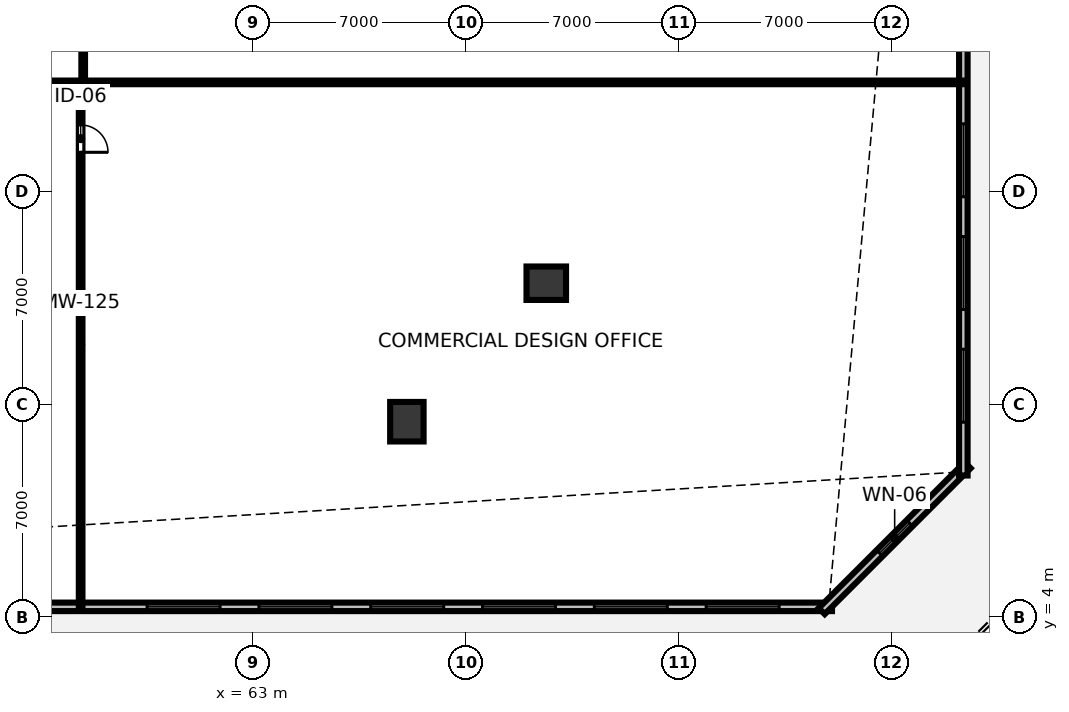
"""IFC4 building model, lengths in metres.
Left out: names, types, materials, properties, quantities, classifications, styles, units other than length and angle.
Written with IfcOpenShell. Run it as: python <this file> out.ifc"""

import sys

from ifc_helpers import new_model, si_unit, direction, frame, frame_2d, origin, origin_2d, place, context, subcontext, project, spatial, rectangle, hollow_rectangle, extrude, element, fill, save


model = new_model("IFC4")
c1 = context("Model", 3, precision=1e-05, world=origin(), true_north=direction((0.0, 1.0)))
c2 = subcontext(c1, "Body", "Model", "MODEL_VIEW")
j1 = project(units=[si_unit("LENGTHUNIT", "METRE"), si_unit("PLANEANGLEUNIT", "RADIAN")], contexts=[c1])
p1 = place(None, origin())
s1 = spatial("IfcSite", under=j1, at=p1, CompositionType="ELEMENT")
p2 = place(p1, origin())
s2 = spatial("IfcBuilding", under=s1, at=p2, CompositionType="ELEMENT")
p3 = place(p2, frame((0.0, 0.0, 5.0)))
s3 = spatial("IfcBuildingStorey", under=s2, at=p3, CompositionType="ELEMENT", Elevation=5.0)
for number, where, z_axis, x_axis in (
    (1, (68.057, 10.429, 0.0), (0.0, 0.0, 1.0), (1.0, 0.0, 0.0)),
    (2, (72.642, 14.984, 0.0), (0.0, 0.0, 1.0), (0.0, 1.0, 0.0)),
):
    element("IfcColumn", number, at=place(p3, frame(where, z_axis=z_axis, x_axis=x_axis)), inside=s3, PredefinedType="COLUMN", context=c2, shape_type="SweptSolid", body=[
        extrude(hollow_rectangle(XDim=1.1, YDim=1.3, WallThickness=0.07, at=origin_2d()), origin(), (0.0, 0.0, 1.0), 4.218),
    ])
p4 = place(p3, frame((9.96, 4.34, 0.0), z_axis=(0.0, 0.0, 1.0), x_axis=(1.0, 0.0, 0.0)))
e3 = element("IfcWall", 3, at=p4, inside=s3, PredefinedType="STANDARD", context=c2, shape_type="SweptSolid", body=[
    extrude(rectangle(XDim=72.08, YDim=0.28, at=frame_2d((36.04, 0.0))), origin(), (0.0, 0.0, 1.0), 4.22),
])
p5 = place(p4, frame((1.739, 0.0, 0.85)))
e4 = element("IfcOpeningElement", 4, at=p5, cuts=e3, PredefinedType="OPENING", context=c2, shape_type="SweptSolid", body=[
    extrude(rectangle(XDim=2.4, YDim=2.4, at=frame_2d((1.2, 1.2))), frame((0.0, 0.15, 0.0), z_axis=(0.0, -1.0, 0.0), x_axis=(1.0, 0.0, 0.0)), (0.0, 0.0, 1.0), 0.3),
])
p6 = place(p4, frame((5.417, 0.0, 0.85)))
e5 = element("IfcOpeningElement", 5, at=p6, cuts=e3, PredefinedType="OPENING", context=c2, shape_type="SweptSolid", body=[
    extrude(rectangle(XDim=2.4, YDim=2.4, at=frame_2d((1.2, 1.2))), frame((0.0, 0.15, 0.0), z_axis=(0.0, -1.0, 0.0), x_axis=(1.0, 0.0, 0.0)), (0.0, 0.0, 1.0), 0.3),
])
p7 = place(p4, frame((9.095, 0.0, 0.85)))
e6 = element("IfcOpeningElement", 6, at=p7, cuts=e3, PredefinedType="OPENING", context=c2, shape_type="SweptSolid", body=[
    extrude(rectangle(XDim=2.4, YDim=2.4, at=frame_2d((1.2, 1.2))), frame((0.0, 0.15, 0.0), z_axis=(0.0, -1.0, 0.0), x_axis=(1.0, 0.0, 0.0)), (0.0, 0.0, 1.0), 0.3),
])
p8 = place(p4, frame((12.773, 0.0, 0.85)))
e7 = element("IfcOpeningElement", 7, at=p8, cuts=e3, PredefinedType="OPENING", context=c2, shape_type="SweptSolid", body=[
    extrude(rectangle(XDim=2.4, YDim=2.4, at=frame_2d((1.2, 1.2))), frame((0.0, 0.15, 0.0), z_axis=(0.0, -1.0, 0.0), x_axis=(1.0, 0.0, 0.0)), (0.0, 0.0, 1.0), 0.3),
])
p9 = place(p4, frame((16.45, 0.0, 0.85)))
e8 = element("IfcOpeningElement", 8, at=p9, cuts=e3, PredefinedType="OPENING", context=c2, shape_type="SweptSolid", body=[
    extrude(rectangle(XDim=2.4, YDim=2.4, at=frame_2d((1.2, 1.2))), frame((0.0, 0.15, 0.0), z_axis=(0.0, -1.0, 0.0), x_axis=(1.0, 0.0, 0.0)), (0.0, 0.0, 1.0), 0.3),
])
p10 = place(p4, frame((20.128, 0.0, 0.85)))
e9 = element("IfcOpeningElement", 9, at=p10, cuts=e3, PredefinedType="OPENING", context=c2, shape_type="SweptSolid", body=[
    extrude(rectangle(XDim=2.4, YDim=2.4, at=frame_2d((1.2, 1.2))), frame((0.0, 0.15, 0.0), z_axis=(0.0, -1.0, 0.0), x_axis=(1.0, 0.0, 0.0)), (0.0, 0.0, 1.0), 0.3),
])
p11 = place(p4, frame((23.806, 0.0, 0.85)))
e10 = element("IfcOpeningElement", 10, at=p11, cuts=e3, PredefinedType="OPENING", context=c2, shape_type="SweptSolid", body=[
    extrude(rectangle(XDim=2.4, YDim=2.4, at=frame_2d((1.2, 1.2))), frame((0.0, 0.15, 0.0), z_axis=(0.0, -1.0, 0.0), x_axis=(1.0, 0.0, 0.0)), (0.0, 0.0, 1.0), 0.3),
])
p12 = place(p4, frame((27.484, 0.0, 0.85)))
e11 = element("IfcOpeningElement", 11, at=p12, cuts=e3, PredefinedType="OPENING", context=c2, shape_type="SweptSolid", body=[
    extrude(rectangle(XDim=2.4, YDim=2.4, at=frame_2d((1.2, 1.2))), frame((0.0, 0.15, 0.0), z_axis=(0.0, -1.0, 0.0), x_axis=(1.0, 0.0, 0.0)), (0.0, 0.0, 1.0), 0.3),
])
p13 = place(p4, frame((31.162, 0.0, 0.85)))
e12 = element("IfcOpeningElement", 12, at=p13, cuts=e3, PredefinedType="OPENING", context=c2, shape_type="SweptSolid", body=[
    extrude(rectangle(XDim=2.4, YDim=2.4, at=frame_2d((1.2, 1.2))), frame((0.0, 0.15, 0.0), z_axis=(0.0, -1.0, 0.0), x_axis=(1.0, 0.0, 0.0)), (0.0, 0.0, 1.0), 0.3),
])
p14 = place(p4, frame((34.84, 0.0, 0.85)))
e13 = element("IfcOpeningElement", 13, at=p14, cuts=e3, PredefinedType="OPENING", context=c2, shape_type="SweptSolid", body=[
    extrude(rectangle(XDim=2.4, YDim=2.4, at=frame_2d((1.2, 1.2))), frame((0.0, 0.15, 0.0), z_axis=(0.0, -1.0, 0.0), x_axis=(1.0, 0.0, 0.0)), (0.0, 0.0, 1.0), 0.3),
])
p15 = place(p4, frame((38.518, 0.0, 0.85)))
e14 = element("IfcOpeningElement", 14, at=p15, cuts=e3, PredefinedType="OPENING", context=c2, shape_type="SweptSolid", body=[
    extrude(rectangle(XDim=2.4, YDim=2.4, at=frame_2d((1.2, 1.2))), frame((0.0, 0.15, 0.0), z_axis=(0.0, -1.0, 0.0), x_axis=(1.0, 0.0, 0.0)), (0.0, 0.0, 1.0), 0.3),
])
p16 = place(p4, frame((42.196, 0.0, 0.85)))
e15 = element("IfcOpeningElement", 15, at=p16, cuts=e3, PredefinedType="OPENING", context=c2, shape_type="SweptSolid", body=[
    extrude(rectangle(XDim=2.4, YDim=2.4, at=frame_2d((1.2, 1.2))), frame((0.0, 0.15, 0.0), z_axis=(0.0, -1.0, 0.0), x_axis=(1.0, 0.0, 0.0)), (0.0, 0.0, 1.0), 0.3),
])
p17 = place(p4, frame((49.552, 0.0, 0.85)))
e16 = element("IfcOpeningElement", 16, at=p17, cuts=e3, PredefinedType="OPENING", context=c2, shape_type="SweptSolid", body=[
    extrude(rectangle(XDim=2.4, YDim=2.4, at=frame_2d((1.2, 1.2))), frame((0.0, 0.15, 0.0), z_axis=(0.0, -1.0, 0.0), x_axis=(1.0, 0.0, 0.0)), (0.0, 0.0, 1.0), 0.3),
])
p18 = place(p4, frame((53.229, 0.0, 0.85)))
e17 = element("IfcOpeningElement", 17, at=p18, cuts=e3, PredefinedType="OPENING", context=c2, shape_type="SweptSolid", body=[
    extrude(rectangle(XDim=2.4, YDim=2.4, at=frame_2d((1.2, 1.2))), frame((0.0, 0.15, 0.0), z_axis=(0.0, -1.0, 0.0), x_axis=(1.0, 0.0, 0.0)), (0.0, 0.0, 1.0), 0.3),
])
p19 = place(p4, frame((56.907, 0.0, 0.85)))
e18 = element("IfcOpeningElement", 18, at=p19, cuts=e3, PredefinedType="OPENING", context=c2, shape_type="SweptSolid", body=[
    extrude(rectangle(XDim=2.4, YDim=2.4, at=frame_2d((1.2, 1.2))), frame((0.0, 0.15, 0.0), z_axis=(0.0, -1.0, 0.0), x_axis=(1.0, 0.0, 0.0)), (0.0, 0.0, 1.0), 0.3),
])
p20 = place(p4, frame((60.585, 0.0, 0.85)))
e19 = element("IfcOpeningElement", 19, at=p20, cuts=e3, PredefinedType="OPENING", context=c2, shape_type="SweptSolid", body=[
    extrude(rectangle(XDim=2.4, YDim=2.4, at=frame_2d((1.2, 1.2))), frame((0.0, 0.15, 0.0), z_axis=(0.0, -1.0, 0.0), x_axis=(1.0, 0.0, 0.0)), (0.0, 0.0, 1.0), 0.3),
])
p21 = place(p4, frame((64.263, 0.0, 0.85)))
e20 = element("IfcOpeningElement", 20, at=p21, cuts=e3, PredefinedType="OPENING", context=c2, shape_type="SweptSolid", body=[
    extrude(rectangle(XDim=2.4, YDim=2.4, at=frame_2d((1.2, 1.2))), frame((0.0, 0.15, 0.0), z_axis=(0.0, -1.0, 0.0), x_axis=(1.0, 0.0, 0.0)), (0.0, 0.0, 1.0), 0.3),
])
p22 = place(p4, frame((67.941, 0.0, 0.85)))
e21 = element("IfcOpeningElement", 21, at=p22, cuts=e3, PredefinedType="OPENING", context=c2, shape_type="SweptSolid", body=[
    extrude(rectangle(XDim=2.4, YDim=2.4, at=frame_2d((1.2, 1.2))), frame((0.0, 0.15, 0.0), z_axis=(0.0, -1.0, 0.0), x_axis=(1.0, 0.0, 0.0)), (0.0, 0.0, 1.0), 0.3),
])
p23 = place(p3, frame((81.702, 4.2, 0.0), z_axis=(0.0, 0.0, 1.0), x_axis=(0.707106781187, 0.707106781187, 0.0)))
e22 = element("IfcWall", 22, at=p23, inside=s3, PredefinedType="STANDARD", context=c2, shape_type="SweptSolid", body=[
    extrude(rectangle(XDim=6.786, YDim=0.28, at=frame_2d((3.393, 0.0))), origin(), (0.0, 0.0, 1.0), 4.22),
])
p24 = place(p23, frame((2.693, 0.0, 1.5)))
e23 = element("IfcOpeningElement", 23, at=p24, cuts=e22, PredefinedType="OPENING", context=c2, shape_type="SweptSolid", body=[
    extrude(rectangle(XDim=1.4, YDim=1.2, at=frame_2d((0.7, 0.6))), frame((0.0, 0.15, 0.0), z_axis=(0.0, -1.0, 0.0), x_axis=(1.0, 0.0, 0.0)), (0.0, 0.0, 1.0), 0.3),
])
p25 = place(p3, frame((86.36, 8.66, 0.0), z_axis=(0.0, 0.0, 1.0), x_axis=(0.0, 1.0, 0.0)))
e24 = element("IfcWall", 24, at=p25, inside=s3, PredefinedType="STANDARD", context=c2, shape_type="SweptSolid", body=[
    extrude(rectangle(XDim=46.68, YDim=0.28, at=frame_2d((23.34, 0.0))), origin(), (0.0, 0.0, 1.0), 4.22),
])
p26 = place(p25, frame((27.74, 0.0, 0.0)))
e25 = element("IfcOpeningElement", 25, at=p26, cuts=e24, PredefinedType="OPENING", context=c2, shape_type="SweptSolid", body=[
    extrude(rectangle(XDim=1.6, YDim=2.15, at=frame_2d((0.8, 1.075))), frame((0.0, 0.15, 0.0), z_axis=(0.0, -1.0, 0.0), x_axis=(1.0, 0.0, 0.0)), (0.0, 0.0, 1.0), 0.3),
])
p27 = place(p25, frame((1.753, 0.0, 0.85)))
e26 = element("IfcOpeningElement", 26, at=p27, cuts=e24, PredefinedType="OPENING", context=c2, shape_type="SweptSolid", body=[
    extrude(rectangle(XDim=2.4, YDim=2.4, at=frame_2d((1.2, 1.2))), frame((0.0, 0.15, 0.0), z_axis=(0.0, -1.0, 0.0), x_axis=(1.0, 0.0, 0.0)), (0.0, 0.0, 1.0), 0.3),
])
p28 = place(p25, frame((5.46, 0.0, 0.85)))
e27 = element("IfcOpeningElement", 27, at=p28, cuts=e24, PredefinedType="OPENING", context=c2, shape_type="SweptSolid", body=[
    extrude(rectangle(XDim=2.4, YDim=2.4, at=frame_2d((1.2, 1.2))), frame((0.0, 0.15, 0.0), z_axis=(0.0, -1.0, 0.0), x_axis=(1.0, 0.0, 0.0)), (0.0, 0.0, 1.0), 0.3),
])
p29 = place(p25, frame((9.167, 0.0, 0.85)))
e28 = element("IfcOpeningElement", 28, at=p29, cuts=e24, PredefinedType="OPENING", context=c2, shape_type="SweptSolid", body=[
    extrude(rectangle(XDim=2.4, YDim=2.4, at=frame_2d((1.2, 1.2))), frame((0.0, 0.15, 0.0), z_axis=(0.0, -1.0, 0.0), x_axis=(1.0, 0.0, 0.0)), (0.0, 0.0, 1.0), 0.3),
])
p30 = place(p25, frame((16.58, 0.0, 0.85)))
e29 = element("IfcOpeningElement", 29, at=p30, cuts=e24, PredefinedType="OPENING", context=c2, shape_type="SweptSolid", body=[
    extrude(rectangle(XDim=2.4, YDim=2.4, at=frame_2d((1.2, 1.2))), frame((0.0, 0.15, 0.0), z_axis=(0.0, -1.0, 0.0), x_axis=(1.0, 0.0, 0.0)), (0.0, 0.0, 1.0), 0.3),
])
p31 = place(p25, frame((20.287, 0.0, 0.85)))
e30 = element("IfcOpeningElement", 30, at=p31, cuts=e24, PredefinedType="OPENING", context=c2, shape_type="SweptSolid", body=[
    extrude(rectangle(XDim=2.4, YDim=2.4, at=frame_2d((1.2, 1.2))), frame((0.0, 0.15, 0.0), z_axis=(0.0, -1.0, 0.0), x_axis=(1.0, 0.0, 0.0)), (0.0, 0.0, 1.0), 0.3),
])
p32 = place(p25, frame((23.993, 0.0, 0.85)))
e31 = element("IfcOpeningElement", 31, at=p32, cuts=e24, PredefinedType="OPENING", context=c2, shape_type="SweptSolid", body=[
    extrude(rectangle(XDim=2.4, YDim=2.4, at=frame_2d((1.2, 1.2))), frame((0.0, 0.15, 0.0), z_axis=(0.0, -1.0, 0.0), x_axis=(1.0, 0.0, 0.0)), (0.0, 0.0, 1.0), 0.3),
])
p33 = place(p25, frame((35.113, 0.0, 0.85)))
e32 = element("IfcOpeningElement", 32, at=p33, cuts=e24, PredefinedType="OPENING", context=c2, shape_type="SweptSolid", body=[
    extrude(rectangle(XDim=2.4, YDim=2.4, at=frame_2d((1.2, 1.2))), frame((0.0, 0.15, 0.0), z_axis=(0.0, -1.0, 0.0), x_axis=(1.0, 0.0, 0.0)), (0.0, 0.0, 1.0), 0.3),
])
p34 = place(p25, frame((38.82, 0.0, 0.85)))
e33 = element("IfcOpeningElement", 33, at=p34, cuts=e24, PredefinedType="OPENING", context=c2, shape_type="SweptSolid", body=[
    extrude(rectangle(XDim=2.4, YDim=2.4, at=frame_2d((1.2, 1.2))), frame((0.0, 0.15, 0.0), z_axis=(0.0, -1.0, 0.0), x_axis=(1.0, 0.0, 0.0)), (0.0, 0.0, 1.0), 0.3),
])
p35 = place(p25, frame((42.527, 0.0, 0.85)))
e34 = element("IfcOpeningElement", 34, at=p35, cuts=e24, PredefinedType="OPENING", context=c2, shape_type="SweptSolid", body=[
    extrude(rectangle(XDim=2.4, YDim=2.4, at=frame_2d((1.2, 1.2))), frame((0.0, 0.15, 0.0), z_axis=(0.0, -1.0, 0.0), x_axis=(1.0, 0.0, 0.0)), (0.0, 0.0, 1.0), 0.3),
])
p36 = place(p3, frame((57.326, 21.59, 0.0), z_axis=(0.0, 0.0, 1.0), x_axis=(0.0, -1.0, 0.0)))
e35 = element("IfcWall", 35, at=p36, inside=s3, PredefinedType="MOVABLE", context=c2, shape_type="SweptSolid", body=[
    extrude(rectangle(XDim=17.25, YDim=0.12, at=frame_2d((8.625, 0.0))), origin(), (0.0, 0.0, 1.0), 3.32),
])
p37 = place(p36, frame((1.4, 0.0, 0.0)))
e36 = element("IfcOpeningElement", 36, at=p37, cuts=e35, PredefinedType="OPENING", context=c2, shape_type="SweptSolid", body=[
    extrude(rectangle(XDim=0.9, YDim=2.15, at=frame_2d((0.45, 1.075))), frame((0.0, 0.07, 0.0), z_axis=(0.0, -1.0, 0.0), x_axis=(1.0, 0.0, 0.0)), (0.0, 0.0, 1.0), 0.14),
])
p38 = place(p3, frame((34.65, 21.59, 0.0), z_axis=(0.0, 0.0, 1.0), x_axis=(1.0, 0.0, 0.0)))
e37 = element("IfcWall", 37, at=p38, inside=s3, PredefinedType="PARTITIONING", context=c2, shape_type="SweptSolid", body=[
    extrude(rectangle(XDim=22.7, YDim=0.12, at=frame_2d((11.35, 0.0))), origin(), (0.0, 0.0, 1.0), 3.32),
])
p39 = place(p38, frame((10.875, 0.0, 0.0)))
e38 = element("IfcOpeningElement", 38, at=p39, cuts=e37, PredefinedType="OPENING", context=c2, shape_type="SweptSolid", body=[
    extrude(rectangle(XDim=0.95, YDim=2.15, at=frame_2d((0.475, 1.075))), frame((0.0, 0.07, 0.0), z_axis=(0.0, -1.0, 0.0), x_axis=(1.0, 0.0, 0.0)), (0.0, 0.0, 1.0), 0.14),
])
p40 = place(p3, frame((57.41, 21.65, 0.0), z_axis=(0.0, 0.0, 1.0), x_axis=(0.0, 1.0, 0.0)))
e39 = element("IfcWall", 39, at=p40, inside=s3, PredefinedType="PARTITIONING", context=c2, shape_type="SweptSolid", body=[
    extrude(rectangle(XDim=20.7, YDim=0.12, at=frame_2d((10.35, 0.0))), origin(), (0.0, 0.0, 1.0), 3.32),
])
p41 = place(p40, frame((9.875, 0.0, 0.0)))
e40 = element("IfcOpeningElement", 40, at=p41, cuts=e39, PredefinedType="OPENING", context=c2, shape_type="SweptSolid", body=[
    extrude(rectangle(XDim=0.95, YDim=2.15, at=frame_2d((0.475, 1.075))), frame((0.0, 0.07, 0.0), z_axis=(0.0, -1.0, 0.0), x_axis=(1.0, 0.0, 0.0)), (0.0, 0.0, 1.0), 0.14),
])
p42 = place(p3, frame((57.35, 21.59, 0.0), z_axis=(0.0, 0.0, 1.0), x_axis=(1.0, 0.0, 0.0)))
e41 = element("IfcWall", 41, at=p42, inside=s3, PredefinedType="PARTITIONING", context=c2, shape_type="SweptSolid", body=[
    extrude(rectangle(XDim=29.01, YDim=0.12, at=frame_2d((14.505, 0.0))), origin(), (0.0, 0.0, 1.0), 3.32),
])
p43 = place(p17, origin())
e42 = element("IfcWindow", 42, at=p43, inside=s3, PartitioningType="SINGLE_PANEL", PredefinedType="WINDOW", context=c2, shape_type="SweptSolid", body=[
    extrude(rectangle(XDim=2.4, YDim=2.4, at=frame_2d((1.2, 1.2))), frame((0.0, 0.03, 0.0), z_axis=(0.0, -1.0, 0.0), x_axis=(1.0, 0.0, 0.0)), (0.0, 0.0, 1.0), 0.06),
])
fill(e16, e42)
p44 = place(p18, origin())
e43 = element("IfcWindow", 43, at=p44, inside=s3, PartitioningType="SINGLE_PANEL", PredefinedType="WINDOW", context=c2, shape_type="SweptSolid", body=[
    extrude(rectangle(XDim=2.4, YDim=2.4, at=frame_2d((1.2, 1.2))), frame((0.0, 0.03, 0.0), z_axis=(0.0, -1.0, 0.0), x_axis=(1.0, 0.0, 0.0)), (0.0, 0.0, 1.0), 0.06),
])
fill(e17, e43)
p45 = place(p19, origin())
e44 = element("IfcWindow", 44, at=p45, inside=s3, PartitioningType="SINGLE_PANEL", PredefinedType="WINDOW", context=c2, shape_type="SweptSolid", body=[
    extrude(rectangle(XDim=2.4, YDim=2.4, at=frame_2d((1.2, 1.2))), frame((0.0, 0.03, 0.0), z_axis=(0.0, -1.0, 0.0), x_axis=(1.0, 0.0, 0.0)), (0.0, 0.0, 1.0), 0.06),
])
fill(e18, e44)
p46 = place(p20, origin())
e45 = element("IfcWindow", 45, at=p46, inside=s3, PartitioningType="SINGLE_PANEL", PredefinedType="WINDOW", context=c2, shape_type="SweptSolid", body=[
    extrude(rectangle(XDim=2.4, YDim=2.4, at=frame_2d((1.2, 1.2))), frame((0.0, 0.03, 0.0), z_axis=(0.0, -1.0, 0.0), x_axis=(1.0, 0.0, 0.0)), (0.0, 0.0, 1.0), 0.06),
])
fill(e19, e45)
p47 = place(p21, origin())
e46 = element("IfcWindow", 46, at=p47, inside=s3, PartitioningType="SINGLE_PANEL", PredefinedType="WINDOW", context=c2, shape_type="SweptSolid", body=[
    extrude(rectangle(XDim=2.4, YDim=2.4, at=frame_2d((1.2, 1.2))), frame((0.0, 0.03, 0.0), z_axis=(0.0, -1.0, 0.0), x_axis=(1.0, 0.0, 0.0)), (0.0, 0.0, 1.0), 0.06),
])
fill(e20, e46)
p48 = place(p22, origin())
e47 = element("IfcWindow", 47, at=p48, inside=s3, PartitioningType="SINGLE_PANEL", PredefinedType="WINDOW", context=c2, shape_type="SweptSolid", body=[
    extrude(rectangle(XDim=2.4, YDim=2.4, at=frame_2d((1.2, 1.2))), frame((0.0, 0.03, 0.0), z_axis=(0.0, -1.0, 0.0), x_axis=(1.0, 0.0, 0.0)), (0.0, 0.0, 1.0), 0.06),
])
fill(e21, e47)
p49 = place(p24, origin())
e48 = element("IfcWindow", 48, at=p49, inside=s3, PartitioningType="SINGLE_PANEL", PredefinedType="WINDOW", context=c2, shape_type="SweptSolid", body=[
    extrude(rectangle(XDim=1.4, YDim=1.2, at=frame_2d((0.7, 0.6))), frame((0.0, 0.03, 0.0), z_axis=(0.0, -1.0, 0.0), x_axis=(1.0, 0.0, 0.0)), (0.0, 0.0, 1.0), 0.06),
])
fill(e23, e48)
p50 = place(p27, origin())
e49 = element("IfcWindow", 49, at=p50, inside=s3, PartitioningType="SINGLE_PANEL", PredefinedType="WINDOW", context=c2, shape_type="SweptSolid", body=[
    extrude(rectangle(XDim=2.4, YDim=2.4, at=frame_2d((1.2, 1.2))), frame((0.0, 0.03, 0.0), z_axis=(0.0, -1.0, 0.0), x_axis=(1.0, 0.0, 0.0)), (0.0, 0.0, 1.0), 0.06),
])
fill(e26, e49)
p51 = place(p28, origin())
e50 = element("IfcWindow", 50, at=p51, inside=s3, PartitioningType="SINGLE_PANEL", PredefinedType="WINDOW", context=c2, shape_type="SweptSolid", body=[
    extrude(rectangle(XDim=2.4, YDim=2.4, at=frame_2d((1.2, 1.2))), frame((0.0, 0.03, 0.0), z_axis=(0.0, -1.0, 0.0), x_axis=(1.0, 0.0, 0.0)), (0.0, 0.0, 1.0), 0.06),
])
fill(e27, e50)
p52 = place(p29, origin())
e51 = element("IfcWindow", 51, at=p52, inside=s3, PartitioningType="SINGLE_PANEL", PredefinedType="WINDOW", context=c2, shape_type="SweptSolid", body=[
    extrude(rectangle(XDim=2.4, YDim=2.4, at=frame_2d((1.2, 1.2))), frame((0.0, 0.03, 0.0), z_axis=(0.0, -1.0, 0.0), x_axis=(1.0, 0.0, 0.0)), (0.0, 0.0, 1.0), 0.06),
])
fill(e28, e51)
p53 = place(p37, origin())
e52 = element("IfcDoor", 52, at=p53, inside=s3, OperationType="SINGLE_SWING_RIGHT", PredefinedType="DOOR", context=c2, shape_type="SweptSolid", body=[
    extrude(rectangle(XDim=0.9, YDim=2.15, at=frame_2d((0.45, 1.075))), frame((0.0, 0.025, 0.0), z_axis=(0.0, -1.0, 0.0), x_axis=(1.0, 0.0, 0.0)), (0.0, 0.0, 1.0), 0.05),
])
fill(e36, e52)
save(model, sys.argv[1])
